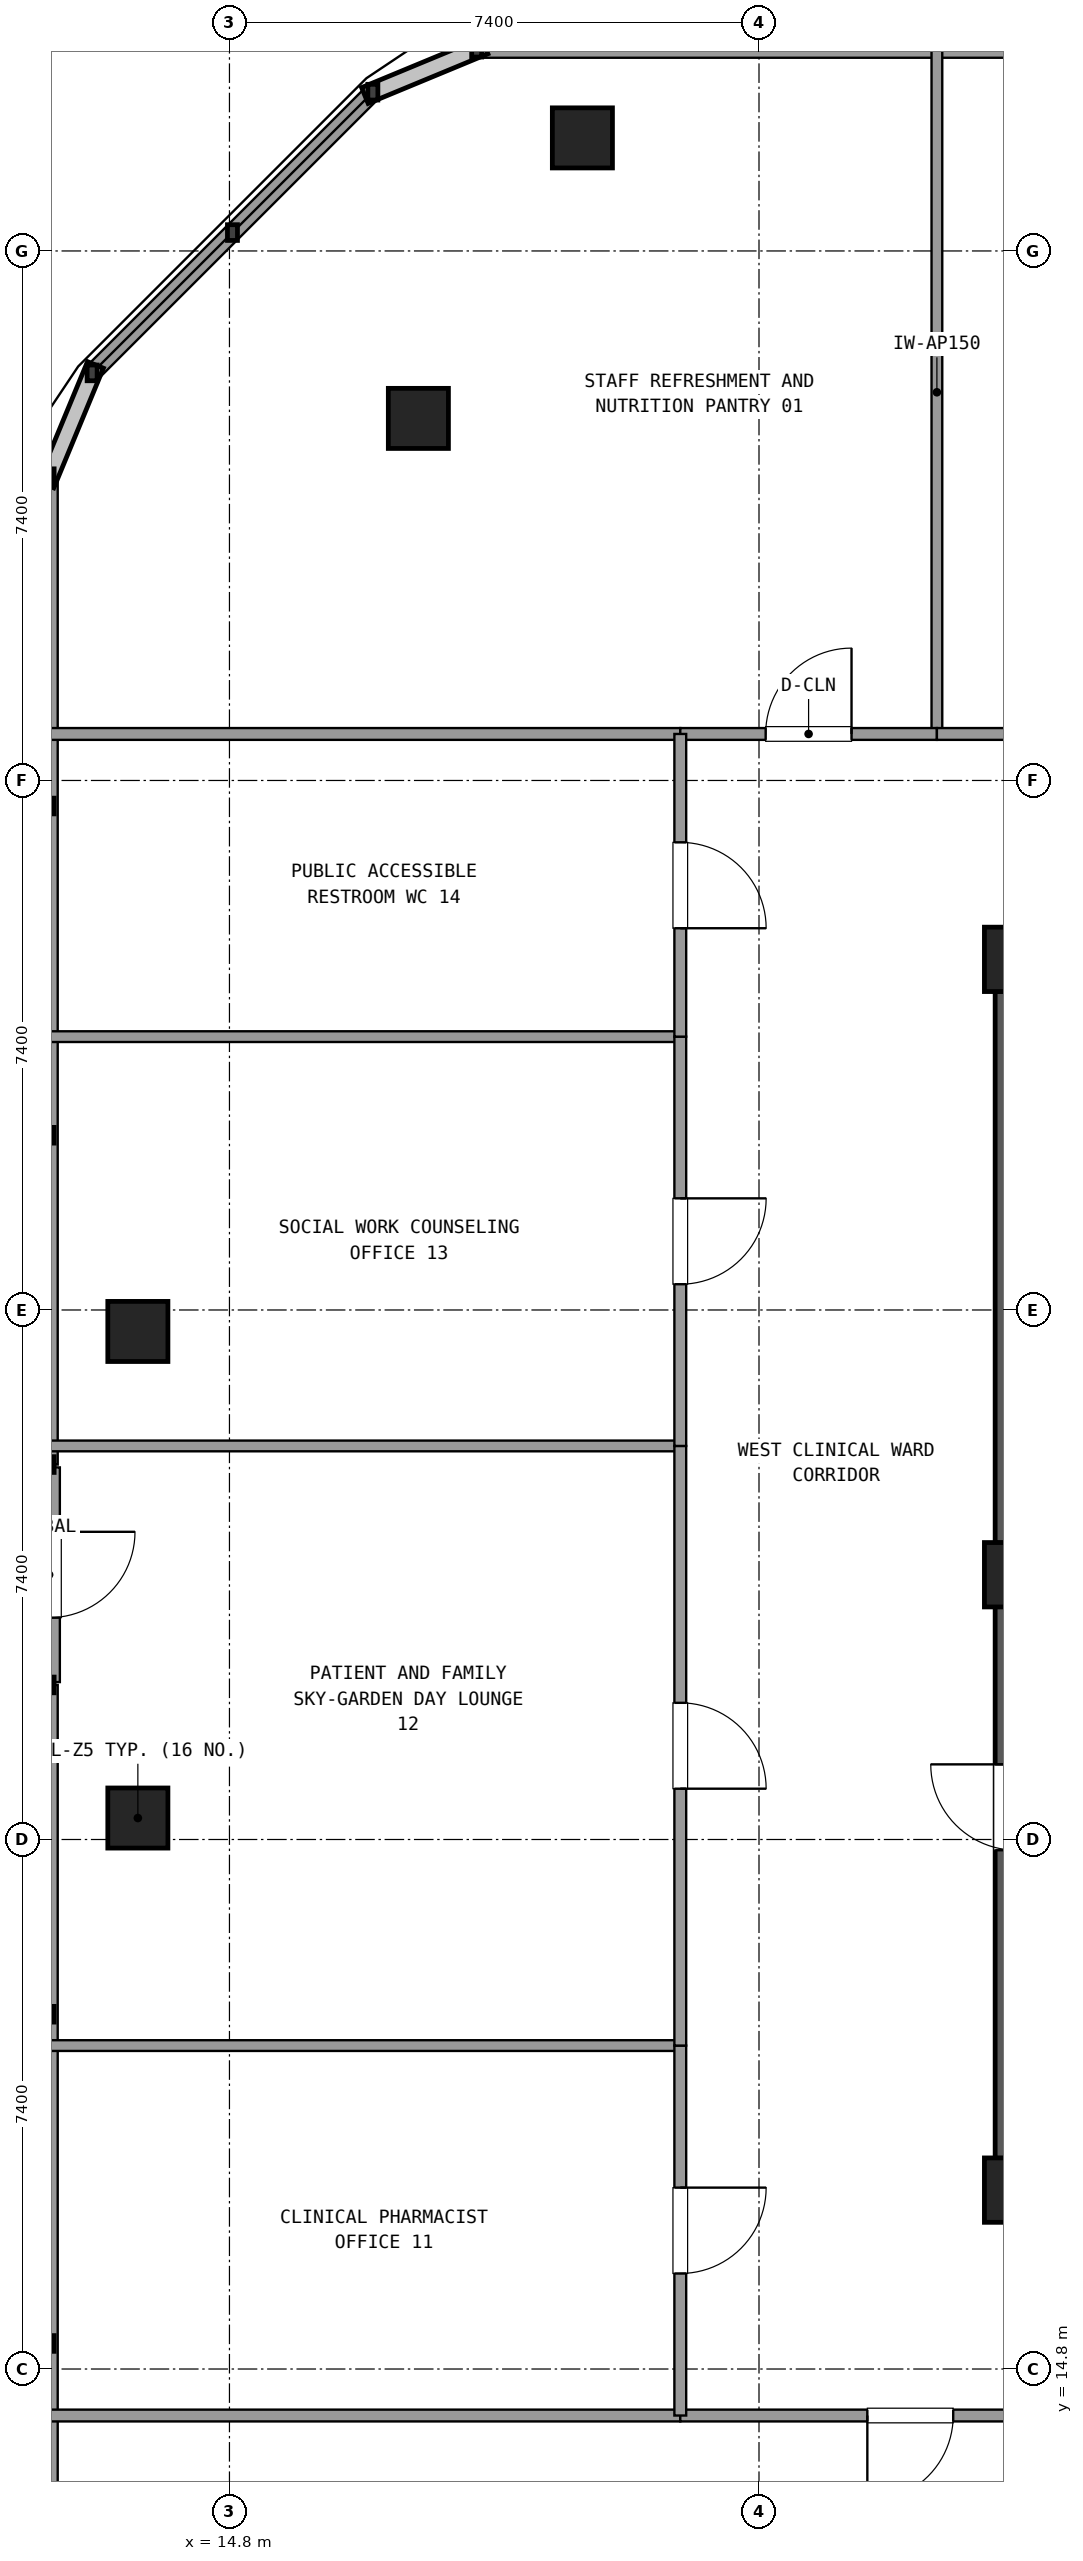
"""IFC4 building model, lengths in metres.
Left out: names, types, materials, properties, quantities, classifications, styles, units other than length and angle.
Written with IfcOpenShell. Run it as: python <this file> out.ifc"""

import sys

from ifc_helpers import new_model, si_unit, direction, frame, frame_2d, origin, origin_2d, place, context, subcontext, project, spatial, rectangle, extrude, element, fill, save


model = new_model("IFC4")
c1 = context("Model", 3, precision=1e-05, world=origin(), true_north=direction((0.0, 1.0)))
c2 = subcontext(c1, "Body", "Model", "MODEL_VIEW")
j1 = project(units=[si_unit("LENGTHUNIT", "METRE"), si_unit("PLANEANGLEUNIT", "RADIAN")], contexts=[c1])
p1 = place(None, origin())
s1 = spatial("IfcSite", under=j1, at=p1, CompositionType="ELEMENT")
p2 = place(p1, origin())
s2 = spatial("IfcBuilding", under=s1, at=p2, CompositionType="ELEMENT")
p3 = place(p2, frame((0.0, 0.0, 250.02)))
s3 = spatial("IfcBuildingStorey", under=s2, at=p3, CompositionType="ELEMENT", Elevation=250.02)
for number, where, z_axis, x_axis in (
    (1, (25.8, 17.3, 0.0), (0.0, 0.0, 1.0), (1.0, 0.0, 0.0)),
    (2, (25.8, 34.5, 0.0), (0.0, 0.0, 1.0), (1.0, 0.0, 0.0)),
    (3, (25.8, 25.9, 0.0), (0.0, 0.0, 1.0), (1.0, 0.0, 0.0)),
):
    element("IfcColumn", number, at=place(p3, frame(where, z_axis=z_axis, x_axis=x_axis)), inside=s3, PredefinedType="COLUMN", context=c2, shape_type="SweptSolid", body=[
        extrude(rectangle(XDim=0.9, YDim=0.9, at=origin_2d()), origin(), (0.0, 0.0, 1.0), 3.6),
    ])
p4 = place(p3, frame((25.8, 34.055, 0.0), z_axis=(0.0, 0.0, 1.0), x_axis=(0.0, -1.0, 0.0)))
e4 = element("IfcWall", 4, at=p4, inside=s3, PredefinedType="SHEAR", context=c2, shape_type="SweptSolid", body=[
    extrude(rectangle(XDim=7.71, YDim=0.6, at=frame_2d((3.855, 0.0))), origin(), (0.0, 0.0, 1.0), 3.32),
])
p5 = place(p3, frame((25.8, 25.455, 0.0), z_axis=(0.0, 0.0, 1.0), x_axis=(0.0, -1.0, 0.0)))
e5 = element("IfcWall", 5, at=p5, inside=s3, PredefinedType="SHEAR", context=c2, shape_type="SweptSolid", body=[
    extrude(rectangle(XDim=7.71, YDim=0.6, at=frame_2d((3.855, 0.0))), origin(), (0.0, 0.0, 1.0), 3.32),
])
p6 = place(p5, frame((2.205, 0.0, 0.0)))
e6 = element("IfcOpeningElement", 6, at=p6, cuts=e5, PredefinedType="OPENING", context=c2, shape_type="SweptSolid", body=[
    extrude(rectangle(XDim=1.2, YDim=2.15, at=frame_2d((0.6, 1.075))), frame((0.0, 0.31, 0.0), z_axis=(0.0, -1.0, 0.0), x_axis=(1.0, 0.0, 0.0)), (0.0, 0.0, 1.0), 0.62),
])
for number, where, z_axis, x_axis in (
    (7, (13.52, 22.5, 0.0), (0.0, 0.0, 1.0), (1.0, 0.0, 0.0)),
    (8, (19.732, 45.98, 0.0), (0.0, 0.0, 1.0), (1.0, 0.0, 0.0)),
    (9, (17.44, 42.06, 0.0), (0.0, 0.0, 1.0), (1.0, 0.0, 0.0)),
    (10, (13.52, 29.3, 0.0), (0.0, 0.0, 1.0), (1.0, 0.0, 0.0)),
):
    element("IfcColumn", number, at=place(p3, frame(where, z_axis=z_axis, x_axis=x_axis)), inside=s3, PredefinedType="COLUMN", context=c2, shape_type="SweptSolid", body=[
        extrude(rectangle(XDim=0.84, YDim=0.84, at=origin_2d()), origin(), (0.0, 0.0, 1.0), 3.6),
    ])
p7 = place(p3, frame((55.745, 47.22, 0.0), z_axis=(0.0, 0.0, 1.0), x_axis=(-1.0, 0.0, 0.0)))
e11 = element("IfcWall", 11, at=p7, inside=s3, PredefinedType="SOLIDWALL", context=c2, shape_type="SweptSolid", body=[
    extrude(rectangle(XDim=37.49, YDim=0.24, at=frame_2d((18.745, 0.0))), origin(), (0.0, 0.0, 1.0), 0.85),
])
p8 = place(p3, frame((16.804, 46.619, 0.0), z_axis=(0.0, 0.0, 1.0), x_axis=(-0.707106781187, -0.707106781187, 0.0)))
e12 = element("IfcWall", 12, at=p8, inside=s3, PredefinedType="SOLIDWALL", context=c2, shape_type="SweptSolid", body=[
    extrude(rectangle(XDim=5.548, YDim=0.24, at=frame_2d((2.774, 0.0))), origin(), (0.0, 0.0, 1.0), 0.85),
])
p9 = place(p3, frame((12.28, 27.4, 0.0), z_axis=(0.0, 0.0, 1.0), x_axis=(0.0, -1.0, 0.0)))
e13 = element("IfcWall", 13, at=p9, inside=s3, PredefinedType="SOLIDWALL", context=c2, shape_type="SweptSolid", body=[
    extrude(rectangle(XDim=3.0, YDim=0.3, at=frame_2d((1.5, 0.0))), origin(), (0.0, 0.0, 1.0), 2.69),
])
p10 = place(p9, frame((0.9, 0.0, 0.0)))
e14 = element("IfcOpeningElement", 14, at=p10, cuts=e13, PredefinedType="OPENING", context=c2, shape_type="SweptSolid", body=[
    extrude(rectangle(XDim=1.2, YDim=2.2, at=frame_2d((0.6, 1.1))), frame((0.0, 0.16, 0.0), z_axis=(0.0, -1.0, 0.0), x_axis=(1.0, 0.0, 0.0)), (0.0, 0.0, 1.0), 0.32),
])
for number, where, z_axis, x_axis in (
    (15, (12.28, 41.245, 0.0), (0.0, 0.0, 1.0), (0.0, -1.0, 0.0)),
    (16, (12.28, 24.36, 0.0), (0.0, 0.0, 1.0), (0.0, -1.0, 0.0)),
):
    element("IfcWall", number, at=place(p3, frame(where, z_axis=z_axis, x_axis=x_axis)), inside=s3, PredefinedType="SOLIDWALL", context=c2, shape_type="SweptSolid", body=[
        extrude(rectangle(XDim=13.805, YDim=0.24, at=frame_2d((6.903, 0.0))), origin(), (0.0, 0.0, 1.0), 0.85),
    ])
for number, where, z_axis, x_axis in (
    (17, (12.3, 37.65, 0.0), (0.0, 0.0, 1.0), (1.0, 0.0, 0.0)),
    (18, (12.3, 14.15, 0.0), (0.0, 0.0, 1.0), (1.0, 0.0, 0.0)),
):
    element("IfcWall", number, at=place(p3, frame(where, z_axis=z_axis, x_axis=x_axis)), inside=s3, PredefinedType="PARTITIONING", context=c2, shape_type="SweptSolid", body=[
        extrude(rectangle(XDim=8.8, YDim=0.165, at=frame_2d((4.4, 0.0))), origin(), (0.0, 0.0, 1.0), 2.61),
    ])
p11 = place(p3, frame((24.686, 37.65, 0.0), z_axis=(0.0, 0.0, 1.0), x_axis=(0.0, 1.0, 0.0)))
e19 = element("IfcWall", 19, at=p11, inside=s3, PredefinedType="PARTITIONING", context=c2, shape_type="SweptSolid", body=[
    extrude(rectangle(XDim=9.55, YDim=0.15, at=frame_2d((4.775, 0.0))), origin(), (0.0, 0.0, 1.0), 2.61),
])
p12 = place(p3, frame((21.1, 37.65, 0.0), z_axis=(0.0, 0.0, 1.0), x_axis=(1.0, 0.0, 0.0)))
e20 = element("IfcWall", 20, at=p12, inside=s3, PredefinedType="PARTITIONING", context=c2, shape_type="SweptSolid", body=[
    extrude(rectangle(XDim=3.586, YDim=0.165, at=frame_2d((1.793, 0.0))), origin(), (0.0, 0.0, 1.0), 2.61),
])
p13 = place(p12, frame((1.193, 0.0, 0.0)))
e21 = element("IfcOpeningElement", 21, at=p13, cuts=e20, PredefinedType="OPENING", context=c2, shape_type="SweptSolid", body=[
    extrude(rectangle(XDim=1.2, YDim=2.15, at=frame_2d((0.6, 1.075))), frame((0.0, 0.093, 0.0), z_axis=(0.0, -1.0, 0.0), x_axis=(1.0, 0.0, 0.0)), (0.0, 0.0, 1.0), 0.185),
])
p14 = place(p3, frame((24.686, 37.65, 0.0), z_axis=(0.0, 0.0, 1.0), x_axis=(1.0, 0.0, 0.0)))
e22 = element("IfcWall", 22, at=p14, inside=s3, PredefinedType="PARTITIONING", context=c2, shape_type="SweptSolid", body=[
    extrude(rectangle(XDim=8.999, YDim=0.165, at=frame_2d((4.5, 0.0))), origin(), (0.0, 0.0, 1.0), 2.61),
])
p15 = place(p14, frame((3.9, 0.0, 0.0)))
e23 = element("IfcOpeningElement", 23, at=p15, cuts=e22, PredefinedType="OPENING", context=c2, shape_type="SweptSolid", body=[
    extrude(rectangle(XDim=1.2, YDim=2.15, at=frame_2d((0.6, 1.075))), frame((0.0, 0.093, 0.0), z_axis=(0.0, -1.0, 0.0), x_axis=(1.0, 0.0, 0.0)), (0.0, 0.0, 1.0), 0.185),
])
p16 = place(p3, frame((21.1, 14.15, 0.0), z_axis=(0.0, 0.0, 1.0), x_axis=(1.0, 0.0, 0.0)))
e24 = element("IfcWall", 24, at=p16, inside=s3, PredefinedType="PARTITIONING", context=c2, shape_type="SweptSolid", body=[
    extrude(rectangle(XDim=6.428, YDim=0.165, at=frame_2d((3.214, 0.0))), origin(), (0.0, 0.0, 1.0), 2.61),
])
p17 = place(p16, frame((2.614, 0.0, 0.0)))
e25 = element("IfcOpeningElement", 25, at=p17, cuts=e24, PredefinedType="OPENING", context=c2, shape_type="SweptSolid", body=[
    extrude(rectangle(XDim=1.2, YDim=2.15, at=frame_2d((0.6, 1.075))), frame((0.0, 0.093, 0.0), z_axis=(0.0, -1.0, 0.0), x_axis=(1.0, 0.0, 0.0)), (0.0, 0.0, 1.0), 0.185),
])
p18 = place(p3, frame((21.1, 19.32, 0.0), z_axis=(0.0, 0.0, 1.0), x_axis=(-1.0, 0.0, 0.0)))
e26 = element("IfcWall", 26, at=p18, inside=s3, PredefinedType="PARTITIONING", context=c2, shape_type="SweptSolid", body=[
    extrude(rectangle(XDim=8.8, YDim=0.15, at=frame_2d((4.4, 0.0))), origin(), (0.0, 0.0, 1.0), 2.61),
])
p19 = place(p3, frame((21.1, 14.15, 0.0), z_axis=(0.0, 0.0, 1.0), x_axis=(0.0, 1.0, 0.0)))
e27 = element("IfcWall", 27, at=p19, inside=s3, PredefinedType="PARTITIONING", context=c2, shape_type="SweptSolid", body=[
    extrude(rectangle(XDim=5.17, YDim=0.165, at=frame_2d((2.585, 0.0))), origin(), (0.0, 0.0, 1.0), 2.61),
])
p20 = place(p19, frame((1.985, 0.0, 0.0)))
e28 = element("IfcOpeningElement", 28, at=p20, cuts=e27, PredefinedType="OPENING", context=c2, shape_type="SweptSolid", body=[
    extrude(rectangle(XDim=1.2, YDim=2.15, at=frame_2d((0.6, 1.075))), frame((0.0, 0.093, 0.0), z_axis=(0.0, -1.0, 0.0), x_axis=(1.0, 0.0, 0.0)), (0.0, 0.0, 1.0), 0.185),
])
p21 = place(p3, frame((21.1, 27.7, 0.0), z_axis=(0.0, 0.0, 1.0), x_axis=(-1.0, 0.0, 0.0)))
e29 = element("IfcWall", 29, at=p21, inside=s3, PredefinedType="PARTITIONING", context=c2, shape_type="SweptSolid", body=[
    extrude(rectangle(XDim=8.8, YDim=0.15, at=frame_2d((4.4, 0.0))), origin(), (0.0, 0.0, 1.0), 2.61),
])
p22 = place(p3, frame((21.1, 19.32, 0.0), z_axis=(0.0, 0.0, 1.0), x_axis=(0.0, 1.0, 0.0)))
e30 = element("IfcWall", 30, at=p22, inside=s3, PredefinedType="PARTITIONING", context=c2, shape_type="SweptSolid", body=[
    extrude(rectangle(XDim=8.38, YDim=0.165, at=frame_2d((4.19, 0.0))), origin(), (0.0, 0.0, 1.0), 2.61),
])
p23 = place(p22, frame((3.59, 0.0, 0.0)))
e31 = element("IfcOpeningElement", 31, at=p23, cuts=e30, PredefinedType="OPENING", context=c2, shape_type="SweptSolid", body=[
    extrude(rectangle(XDim=1.2, YDim=2.15, at=frame_2d((0.6, 1.075))), frame((0.0, 0.093, 0.0), z_axis=(0.0, -1.0, 0.0), x_axis=(1.0, 0.0, 0.0)), (0.0, 0.0, 1.0), 0.185),
])
p24 = place(p3, frame((21.1, 33.42, 0.0), z_axis=(0.0, 0.0, 1.0), x_axis=(-1.0, 0.0, 0.0)))
e32 = element("IfcWall", 32, at=p24, inside=s3, PredefinedType="PARTITIONING", context=c2, shape_type="SweptSolid", body=[
    extrude(rectangle(XDim=8.8, YDim=0.15, at=frame_2d((4.4, 0.0))), origin(), (0.0, 0.0, 1.0), 2.61),
])
p25 = place(p3, frame((21.1, 27.7, 0.0), z_axis=(0.0, 0.0, 1.0), x_axis=(0.0, 1.0, 0.0)))
e33 = element("IfcWall", 33, at=p25, inside=s3, PredefinedType="PARTITIONING", context=c2, shape_type="SweptSolid", body=[
    extrude(rectangle(XDim=5.72, YDim=0.165, at=frame_2d((2.86, 0.0))), origin(), (0.0, 0.0, 1.0), 2.61),
])
p26 = place(p25, frame((2.26, 0.0, 0.0)))
e34 = element("IfcOpeningElement", 34, at=p26, cuts=e33, PredefinedType="OPENING", context=c2, shape_type="SweptSolid", body=[
    extrude(rectangle(XDim=1.2, YDim=2.15, at=frame_2d((0.6, 1.075))), frame((0.0, 0.093, 0.0), z_axis=(0.0, -1.0, 0.0), x_axis=(1.0, 0.0, 0.0)), (0.0, 0.0, 1.0), 0.185),
])
p27 = place(p3, frame((21.1, 33.42, 0.0), z_axis=(0.0, 0.0, 1.0), x_axis=(0.0, 1.0, 0.0)))
e35 = element("IfcWall", 35, at=p27, inside=s3, PredefinedType="PARTITIONING", context=c2, shape_type="SweptSolid", body=[
    extrude(rectangle(XDim=4.23, YDim=0.165, at=frame_2d((2.115, 0.0))), origin(), (0.0, 0.0, 1.0), 2.61),
])
p28 = place(p27, frame((1.515, 0.0, 0.0)))
e36 = element("IfcOpeningElement", 36, at=p28, cuts=e35, PredefinedType="OPENING", context=c2, shape_type="SweptSolid", body=[
    extrude(rectangle(XDim=1.2, YDim=2.15, at=frame_2d((0.6, 1.075))), frame((0.0, 0.093, 0.0), z_axis=(0.0, -1.0, 0.0), x_axis=(1.0, 0.0, 0.0)), (0.0, 0.0, 1.0), 0.185),
])
p29 = place(p13, origin())
e37 = element("IfcDoor", 37, at=p29, inside=s3, OperationType="SINGLE_SWING_RIGHT", PredefinedType="DOOR", context=c2, shape_type="SweptSolid", body=[
    extrude(rectangle(XDim=1.2, YDim=2.15, at=frame_2d((0.6, 1.075))), frame((0.0, 0.025, 0.0), z_axis=(0.0, -1.0, 0.0), x_axis=(1.0, 0.0, 0.0)), (0.0, 0.0, 1.0), 0.05),
])
fill(e21, e37)
p30 = place(p17, frame((1.2, 0.0, 0.0), z_axis=(0.0, 0.0, 1.0), x_axis=(-1.0, 0.0, 0.0)))
e38 = element("IfcDoor", 38, at=p30, inside=s3, OperationType="SINGLE_SWING_LEFT", PredefinedType="DOOR", context=c2, shape_type="SweptSolid", body=[
    extrude(rectangle(XDim=1.2, YDim=2.15, at=frame_2d((0.6, 1.075))), frame((0.0, 0.025, 0.0), z_axis=(0.0, -1.0, 0.0), x_axis=(1.0, 0.0, 0.0)), (0.0, 0.0, 1.0), 0.05),
])
fill(e25, e38)
p31 = place(p20, frame((1.2, 0.0, 0.0), z_axis=(0.0, 0.0, 1.0), x_axis=(-1.0, 0.0, 0.0)))
e39 = element("IfcDoor", 39, at=p31, inside=s3, OperationType="SINGLE_SWING_RIGHT", PredefinedType="DOOR", context=c2, shape_type="SweptSolid", body=[
    extrude(rectangle(XDim=1.2, YDim=2.15, at=frame_2d((0.6, 1.075))), frame((0.0, 0.025, 0.0), z_axis=(0.0, -1.0, 0.0), x_axis=(1.0, 0.0, 0.0)), (0.0, 0.0, 1.0), 0.05),
])
fill(e28, e39)
p32 = place(p23, frame((1.2, 0.0, 0.0), z_axis=(0.0, 0.0, 1.0), x_axis=(-1.0, 0.0, 0.0)))
e40 = element("IfcDoor", 40, at=p32, inside=s3, OperationType="SINGLE_SWING_LEFT", PredefinedType="DOOR", context=c2, shape_type="SweptSolid", body=[
    extrude(rectangle(XDim=1.2, YDim=2.15, at=frame_2d((0.6, 1.075))), frame((0.0, 0.025, 0.0), z_axis=(0.0, -1.0, 0.0), x_axis=(1.0, 0.0, 0.0)), (0.0, 0.0, 1.0), 0.05),
])
fill(e31, e40)
p33 = place(p26, frame((1.2, 0.0, 0.0), z_axis=(0.0, 0.0, 1.0), x_axis=(-1.0, 0.0, 0.0)))
e41 = element("IfcDoor", 41, at=p33, inside=s3, OperationType="SINGLE_SWING_RIGHT", PredefinedType="DOOR", context=c2, shape_type="SweptSolid", body=[
    extrude(rectangle(XDim=1.2, YDim=2.15, at=frame_2d((0.6, 1.075))), frame((0.0, 0.025, 0.0), z_axis=(0.0, -1.0, 0.0), x_axis=(1.0, 0.0, 0.0)), (0.0, 0.0, 1.0), 0.05),
])
fill(e34, e41)
p34 = place(p28, frame((1.2, 0.0, 0.0), z_axis=(0.0, 0.0, 1.0), x_axis=(-1.0, 0.0, 0.0)))
e42 = element("IfcDoor", 42, at=p34, inside=s3, OperationType="SINGLE_SWING_LEFT", PredefinedType="DOOR", context=c2, shape_type="SweptSolid", body=[
    extrude(rectangle(XDim=1.2, YDim=2.15, at=frame_2d((0.6, 1.075))), frame((0.0, 0.025, 0.0), z_axis=(0.0, -1.0, 0.0), x_axis=(1.0, 0.0, 0.0)), (0.0, 0.0, 1.0), 0.05),
])
fill(e36, e42)
save(model, sys.argv[1])
